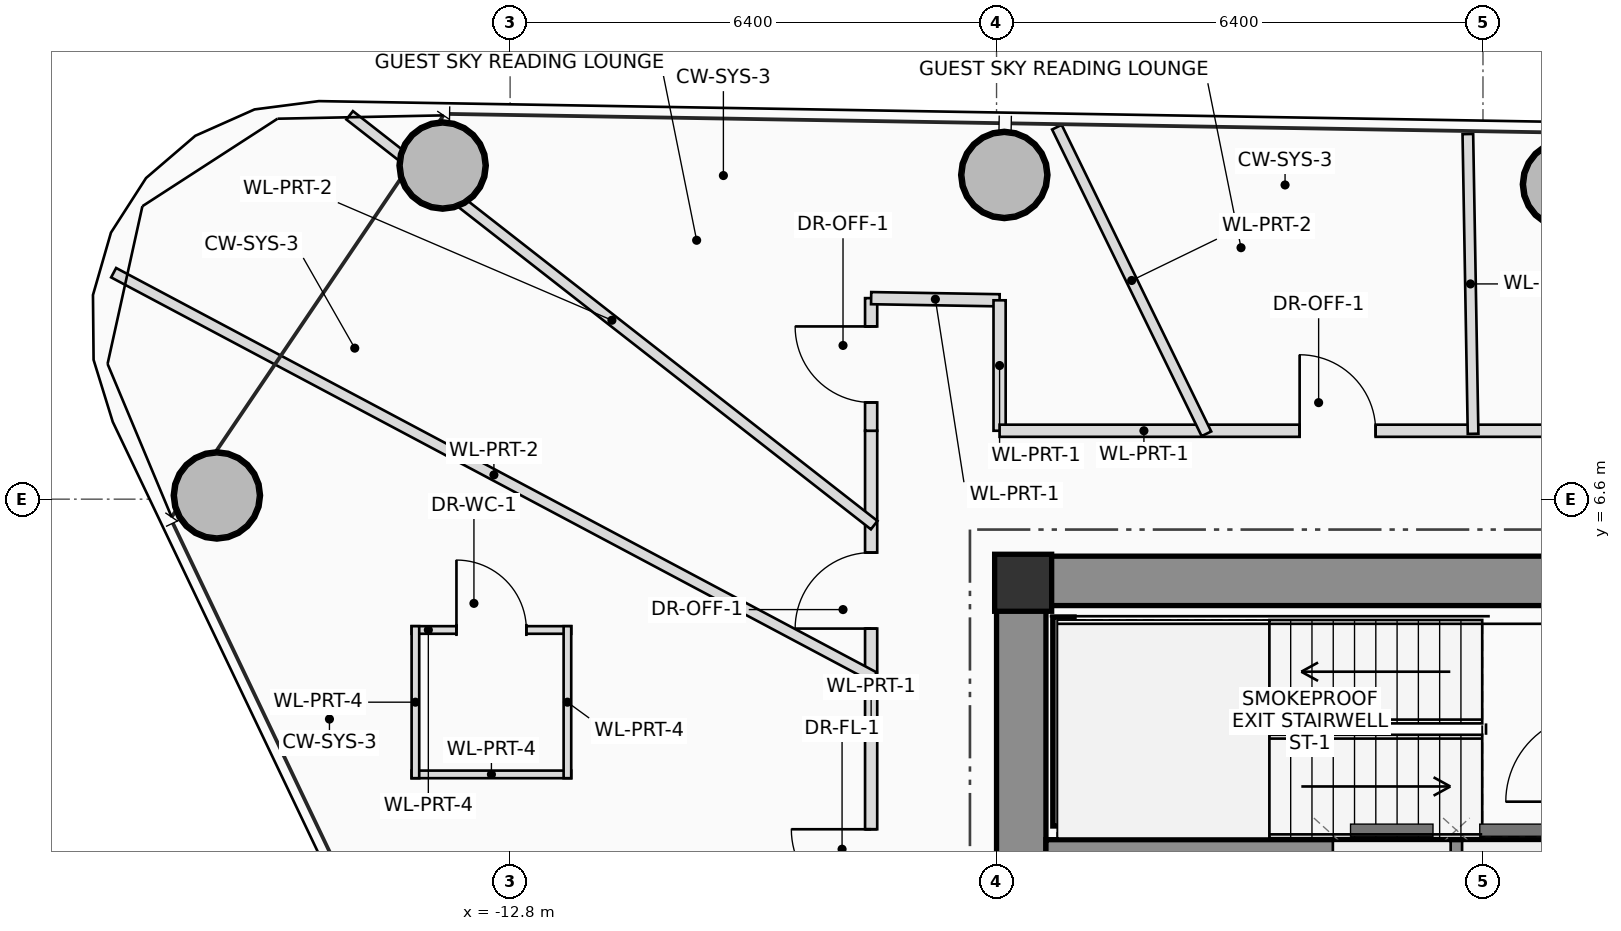
"""IFC4 building model, lengths in metres.
Left out: names, types, materials, properties, quantities, classifications, styles, units other than length and angle.
Written with IfcOpenShell. Run it as: python <this file> out.ifc"""

import sys

from ifc_helpers import new_model, si_unit, direction, frame, frame_2d, origin, origin_2d, place, context, subcontext, project, spatial, rectangle, hollow_circle, extrude, source, transform, mapped, element, fill, save


model = new_model("IFC4")
c1 = context("Model", 3, precision=1e-05, world=origin(), true_north=direction((0.0, 1.0)))
c2 = subcontext(c1, "Body", "Model", "MODEL_VIEW")
j1 = project(units=[si_unit("LENGTHUNIT", "METRE"), si_unit("PLANEANGLEUNIT", "RADIAN")], contexts=[c1])
p1 = place(None, origin())
s1 = spatial("IfcSite", under=j1, at=p1, CompositionType="ELEMENT")
p2 = place(p1, origin())
s2 = spatial("IfcBuilding", under=s1, at=p2, CompositionType="ELEMENT")
p3 = place(p2, frame((0.0, 0.0, 194.9)))
s3 = spatial("IfcBuildingStorey", under=s2, at=p3, CompositionType="ELEMENT", Elevation=194.9)
m1 = source(origin(), c2, "Body", "SweptSolid", [
    extrude(rectangle(XDim=0.75, YDim=0.75, at=origin_2d()), origin(), (0.0, 0.0, 1.0), 3.45),
])
p4 = place(p3, frame((-6.05, 5.5, 0.0), z_axis=(0.0, 0.0, 1.0), x_axis=(1.0, 0.0, 0.0)))
e1 = element("IfcColumn", 1, at=p4, inside=s3, PredefinedType="COLUMN", context=c2, shape_type="MappedRepresentation", body=[
    mapped(m1, transform((0.0, 0.0, 0.0), scale=1.0)),
])
p5 = place(p3, frame((-6.4, 5.525, 0.0), z_axis=(0.0, 0.0, 1.0), x_axis=(1.0, 0.0, 0.0)))
e2 = element("IfcWall", 2, at=p5, inside=s3, PredefinedType="SHEAR", context=c2, shape_type="SweptSolid", body=[
    extrude(rectangle(XDim=12.8, YDim=0.65, at=frame_2d((6.4, 0.0))), origin(), (0.0, 0.0, 1.0), 3.45),
])
p6 = place(p5, frame((8.6, 0.0, 0.0)))
e3 = element("IfcOpeningElement", 3, at=p6, cuts=e2, PredefinedType="OPENING", context=c2, shape_type="SweptSolid", body=[
    extrude(rectangle(XDim=1.2, YDim=2.2, at=frame_2d((0.6, 1.1))), frame((0.0, 0.335, 0.0), z_axis=(0.0, -1.0, 0.0), x_axis=(1.0, 0.0, 0.0)), (0.0, 0.0, 1.0), 0.67),
])
p7 = place(p3, frame((-6.075, 1.75, 0.0), z_axis=(0.0, 0.0, 1.0), x_axis=(0.0, 1.0, 0.0)))
e4 = element("IfcWall", 4, at=p7, inside=s3, PredefinedType="SHEAR", context=c2, shape_type="SweptSolid", body=[
    extrude(rectangle(XDim=3.45, YDim=0.65, at=frame_2d((1.725, 0.0))), origin(), (0.0, 0.0, 1.0), 3.45),
])
p8 = place(p3, frame((-5.75, 1.94, 0.0), z_axis=(0.0, 0.0, 1.0), x_axis=(1.0, 0.0, 0.0)))
e5 = element("IfcWall", 5, at=p8, inside=s3, PredefinedType="SHEAR", context=c2, shape_type="SweptSolid", body=[
    extrude(rectangle(XDim=11.5, YDim=0.36, at=frame_2d((5.75, 0.0))), origin(), (0.0, 0.0, 1.0), 3.45),
])
p9 = place(p3, frame((-5.52, 2.3, 0.0), z_axis=(0.0, 0.0, 1.0), x_axis=(0.0, 1.0, 0.0)))
e6 = element("IfcWall", 6, at=p9, inside=s3, PredefinedType="SHEAR", context=c2, shape_type="SweptSolid", body=[
    extrude(rectangle(XDim=2.75, YDim=0.28, at=frame_2d((1.375, 0.0))), origin(), (0.0, 0.0, 1.0), 3.45),
])
m2 = source(origin(), c2, "Body", "SweptSolid", [
    extrude(hollow_circle(Radius=0.575, WallThickness=0.042, at=origin_2d()), origin(), (0.0, 0.0, 1.0), 3.45),
])
for number, where, z_axis, x_axis in (
    (7, (1.092, 10.742, 0.0), (0.0, 0.0, 1.0), (1.0, 0.0, 0.0)),
    (8, (-6.298, 10.865, 0.0), (0.0, 0.0, 1.0), (1.0, 0.0, 0.0)),
    (9, (-13.688, 10.99, 0.0), (0.0, 0.0, 1.0), (1.0, 0.0, 0.0)),
    (10, (-16.658, 6.649, 0.0), (0.0, 0.0, 1.0), (1.0, 0.0, 0.0)),
):
    element("IfcColumn", number, at=place(p3, frame(where, z_axis=z_axis, x_axis=x_axis)), inside=s3, PredefinedType="COLUMN", context=c2, shape_type="MappedRepresentation", body=[
        mapped(m2, transform((0.0, 0.0, 0.0), scale=1.0)),
    ])
p10 = place(p3, frame((-14.096, 4.879, 0.0), z_axis=(0.0, 0.0, 1.0), x_axis=(1.0, 0.0, 0.0)))
e11 = element("IfcWall", 11, at=p10, inside=s3, PredefinedType="PARTITIONING", context=c2, shape_type="SweptSolid", body=[
    extrude(rectangle(XDim=2.1, YDim=0.1, at=frame_2d((1.05, 0.0))), origin(), (0.0, 0.0, 1.0), 2.905),
])
p11 = place(p10, frame((0.59, 0.0, 0.0)))
e12 = element("IfcOpeningElement", 12, at=p11, cuts=e11, PredefinedType="OPENING", context=c2, shape_type="SweptSolid", body=[
    extrude(rectangle(XDim=0.92, YDim=2.1, at=frame_2d((0.46, 1.05))), frame((0.0, 0.06, 0.0), z_axis=(0.0, -1.0, 0.0), x_axis=(1.0, 0.0, 0.0)), (0.0, 0.0, 1.0), 0.12),
])
p12 = place(p3, frame((-11.996, 2.979, 0.0), z_axis=(0.0, 0.0, 1.0), x_axis=(-1.0, 0.0, 0.0)))
e13 = element("IfcWall", 13, at=p12, inside=s3, PredefinedType="PARTITIONING", context=c2, shape_type="SweptSolid", body=[
    extrude(rectangle(XDim=2.1, YDim=0.1, at=frame_2d((1.05, 0.0))), origin(), (0.0, 0.0, 1.0), 2.905),
])
for number, where, z_axis, x_axis in (
    (14, (-12.046, 4.929, 0.0), (0.0, 0.0, 1.0), (0.0, -1.0, 0.0)),
    (15, (-14.046, 2.929, 0.0), (0.0, 0.0, 1.0), (0.0, 1.0, 0.0)),
):
    element("IfcWall", number, at=place(p3, frame(where, z_axis=z_axis, x_axis=x_axis)), inside=s3, PredefinedType="PARTITIONING", context=c2, shape_type="SweptSolid", body=[
        extrude(rectangle(XDim=2.0, YDim=0.1, at=frame_2d((1.0, 0.0))), origin(), (0.0, 0.0, 1.0), 3.25),
    ])
p13 = place(p3, frame((-8.05, -7.5, 0.0), z_axis=(0.0, 0.0, 1.0), x_axis=(0.0, 1.0, 0.0)))
e16 = element("IfcWall", 16, at=p13, inside=s3, PredefinedType="PARTITIONING", context=c2, shape_type="SweptSolid", body=[
    extrude(rectangle(XDim=15.0, YDim=0.16, at=frame_2d((7.5, 0.0))), origin(), (0.0, 0.0, 1.0), 2.605),
])
p14 = place(p13, frame((2.177, 0.0, 0.0)))
e17 = element("IfcOpeningElement", 17, at=p14, cuts=e16, PredefinedType="OPENING", context=c2, shape_type="SweptSolid", body=[
    extrude(rectangle(XDim=1.0, YDim=2.25, at=frame_2d((0.5, 1.125))), frame((0.0, 0.09, 0.0), z_axis=(0.0, -1.0, 0.0), x_axis=(1.0, 0.0, 0.0)), (0.0, 0.0, 1.0), 0.18),
])
p15 = place(p13, frame((5.453, 0.0, 0.0)))
e18 = element("IfcOpeningElement", 18, at=p15, cuts=e16, PredefinedType="OPENING", context=c2, shape_type="SweptSolid", body=[
    extrude(rectangle(XDim=0.9, YDim=2.05, at=frame_2d((0.45, 1.025))), frame((0.0, 0.09, 0.0), z_axis=(0.0, -1.0, 0.0), x_axis=(1.0, 0.0, 0.0)), (0.0, 0.0, 1.0), 0.18),
])
p16 = place(p13, frame((8.707, 0.0, 0.0)))
e19 = element("IfcOpeningElement", 19, at=p16, cuts=e16, PredefinedType="OPENING", context=c2, shape_type="SweptSolid", body=[
    extrude(rectangle(XDim=1.05, YDim=2.2, at=frame_2d((0.525, 1.1))), frame((0.0, 0.09, 0.0), z_axis=(0.0, -1.0, 0.0), x_axis=(1.0, 0.0, 0.0)), (0.0, 0.0, 1.0), 0.18),
])
p17 = place(p13, frame((12.397, 0.0, 0.0)))
e20 = element("IfcOpeningElement", 20, at=p17, cuts=e16, PredefinedType="OPENING", context=c2, shape_type="SweptSolid", body=[
    extrude(rectangle(XDim=1.0, YDim=2.25, at=frame_2d((0.5, 1.125))), frame((0.0, 0.09, 0.0), z_axis=(0.0, -1.0, 0.0), x_axis=(1.0, 0.0, 0.0)), (0.0, 0.0, 1.0), 0.18),
])
p18 = place(p3, frame((-8.05, 7.5, 0.0), z_axis=(0.0, 0.0, 1.0), x_axis=(0.0, 1.0, 0.0)))
e21 = element("IfcWall", 21, at=p18, inside=s3, PredefinedType="PARTITIONING", context=c2, shape_type="SweptSolid", body=[
    extrude(rectangle(XDim=1.745, YDim=0.16, at=frame_2d((0.872, 0.0))), origin(), (0.0, 0.0, 1.0), 2.805),
])
p19 = place(p18, frame((0.372, 0.0, 0.0)))
e22 = element("IfcOpeningElement", 22, at=p19, cuts=e21, PredefinedType="OPENING", context=c2, shape_type="SweptSolid", body=[
    extrude(rectangle(XDim=1.0, YDim=2.25, at=frame_2d((0.5, 1.125))), frame((0.0, 0.09, 0.0), z_axis=(0.0, -1.0, 0.0), x_axis=(1.0, 0.0, 0.0)), (0.0, 0.0, 1.0), 0.18),
])
p20 = place(p3, frame((-8.05, 9.245, 0.0), z_axis=(0.0, 0.0, 1.0), x_axis=(0.999859611566, -0.016755809729, 0.0)))
e23 = element("IfcWall", 23, at=p20, inside=s3, PredefinedType="PARTITIONING", context=c2, shape_type="SweptSolid", body=[
    extrude(rectangle(XDim=1.69, YDim=0.16, at=frame_2d((0.845, 0.0))), origin(), (0.0, 0.0, 1.0), 2.905),
])
p21 = place(p3, frame((-6.36, 9.216, 0.0), z_axis=(0.0, 0.0, 1.0), x_axis=(0.0, -1.0, 0.0)))
e24 = element("IfcWall", 24, at=p21, inside=s3, PredefinedType="PARTITIONING", context=c2, shape_type="SweptSolid", body=[
    extrude(rectangle(XDim=1.716, YDim=0.16, at=frame_2d((0.858, 0.0))), origin(), (0.0, 0.0, 1.0), 2.605),
])
p22 = place(p3, frame((-6.36, 7.5, 0.0), z_axis=(0.0, 0.0, 1.0), x_axis=(1.0, 0.0, 0.0)))
e25 = element("IfcWall", 25, at=p22, inside=s3, PredefinedType="PARTITIONING", context=c2, shape_type="SweptSolid", body=[
    extrude(rectangle(XDim=11.61, YDim=0.16, at=frame_2d((5.805, 0.0))), origin(), (0.0, 0.0, 1.0), 2.605),
])
p23 = place(p22, frame((3.948, 0.0, 0.0)))
e26 = element("IfcOpeningElement", 26, at=p23, cuts=e25, PredefinedType="OPENING", context=c2, shape_type="SweptSolid", body=[
    extrude(rectangle(XDim=1.0, YDim=2.25, at=frame_2d((0.5, 1.125))), frame((0.0, 0.09, 0.0), z_axis=(0.0, -1.0, 0.0), x_axis=(1.0, 0.0, 0.0)), (0.0, 0.0, 1.0), 0.18),
])
p24 = place(p22, frame((8.993, 0.0, 0.0)))
e27 = element("IfcOpeningElement", 27, at=p24, cuts=e25, PredefinedType="OPENING", context=c2, shape_type="SweptSolid", body=[
    extrude(rectangle(XDim=1.0, YDim=2.25, at=frame_2d((0.5, 1.125))), frame((0.0, 0.09, 0.0), z_axis=(0.0, -1.0, 0.0), x_axis=(1.0, 0.0, 0.0)), (0.0, 0.0, 1.0), 0.18),
])
p25 = place(p3, frame((-0.13, 7.46, 0.0), z_axis=(0.0, 0.0, 1.0), x_axis=(-0.017456477835, 0.999847624082, 0.0)))
e28 = element("IfcWall", 28, at=p25, inside=s3, PredefinedType="PARTITIONING", context=c2, shape_type="SweptSolid", body=[
    extrude(rectangle(XDim=3.944, YDim=0.14, at=frame_2d((1.972, 0.0))), origin(), (0.0, 0.0, 1.0), 2.765),
])
p26 = place(p3, frame((-3.638, 7.46, 0.0), z_axis=(0.0, 0.0, 1.0), x_axis=(-0.438379691007, 0.898789878956, 0.0)))
e29 = element("IfcWall", 29, at=p26, inside=s3, PredefinedType="PARTITIONING", context=c2, shape_type="SweptSolid", body=[
    extrude(rectangle(XDim=4.488, YDim=0.14, at=frame_2d((2.244, 0.0))), origin(), (0.0, 0.0, 1.0), 2.765),
])
p27 = place(p3, frame((-8.01, 6.258, 0.0), z_axis=(0.0, 0.0, 1.0), x_axis=(-0.788015921071, 0.615654861216, 0.0)))
e30 = element("IfcWall", 30, at=p27, inside=s3, PredefinedType="PARTITIONING", context=c2, shape_type="SweptSolid", body=[
    extrude(rectangle(XDim=8.758, YDim=0.14, at=frame_2d((4.379, 0.0))), origin(), (0.0, 0.0, 1.0), 2.805),
])
p28 = place(p3, frame((-8.01, 4.259, 0.0), z_axis=(0.0, 0.0, 1.0), x_axis=(-0.882949150857, 0.469468632606, 0.0)))
e31 = element("IfcWall", 31, at=p28, inside=s3, PredefinedType="PARTITIONING", context=c2, shape_type="SweptSolid", body=[
    extrude(rectangle(XDim=11.333, YDim=0.14, at=frame_2d((5.667, 0.0))), origin(), (0.0, 0.0, 1.0), 2.605),
])
p29 = place(p11, origin())
e32 = element("IfcDoor", 32, at=p29, inside=s3, OperationType="SINGLE_SWING_LEFT", PredefinedType="DOOR", context=c2, shape_type="SweptSolid", body=[
    extrude(rectangle(XDim=0.92, YDim=2.1, at=frame_2d((0.46, 1.05))), frame((0.0, 0.025, 0.0), z_axis=(0.0, -1.0, 0.0), x_axis=(1.0, 0.0, 0.0)), (0.0, 0.0, 1.0), 0.05),
])
fill(e12, e32)
p30 = place(p16, origin())
e33 = element("IfcDoor", 33, at=p30, inside=s3, OperationType="SINGLE_SWING_RIGHT", PredefinedType="DOOR", context=c2, shape_type="SweptSolid", body=[
    extrude(rectangle(XDim=1.05, YDim=2.2, at=frame_2d((0.525, 1.1))), frame((0.0, 0.025, 0.0), z_axis=(0.0, -1.0, 0.0), x_axis=(1.0, 0.0, 0.0)), (0.0, 0.0, 1.0), 0.05),
])
fill(e19, e33)
p31 = place(p17, origin())
e34 = element("IfcDoor", 34, at=p31, inside=s3, OperationType="SINGLE_SWING_LEFT", PredefinedType="DOOR", context=c2, shape_type="SweptSolid", body=[
    extrude(rectangle(XDim=1.0, YDim=2.25, at=frame_2d((0.5, 1.125))), frame((0.0, 0.025, 0.0), z_axis=(0.0, -1.0, 0.0), x_axis=(1.0, 0.0, 0.0)), (0.0, 0.0, 1.0), 0.05),
])
fill(e20, e34)
p32 = place(p19, origin())
e35 = element("IfcDoor", 35, at=p32, inside=s3, OperationType="SINGLE_SWING_RIGHT", PredefinedType="DOOR", context=c2, shape_type="SweptSolid", body=[
    extrude(rectangle(XDim=1.0, YDim=2.25, at=frame_2d((0.5, 1.125))), frame((0.0, 0.025, 0.0), z_axis=(0.0, -1.0, 0.0), x_axis=(1.0, 0.0, 0.0)), (0.0, 0.0, 1.0), 0.05),
])
fill(e22, e35)
p33 = place(p23, origin())
e36 = element("IfcDoor", 36, at=p33, inside=s3, OperationType="SINGLE_SWING_LEFT", PredefinedType="DOOR", context=c2, shape_type="SweptSolid", body=[
    extrude(rectangle(XDim=1.0, YDim=2.25, at=frame_2d((0.5, 1.125))), frame((0.0, 0.025, 0.0), z_axis=(0.0, -1.0, 0.0), x_axis=(1.0, 0.0, 0.0)), (0.0, 0.0, 1.0), 0.05),
])
fill(e26, e36)
save(model, sys.argv[1])
